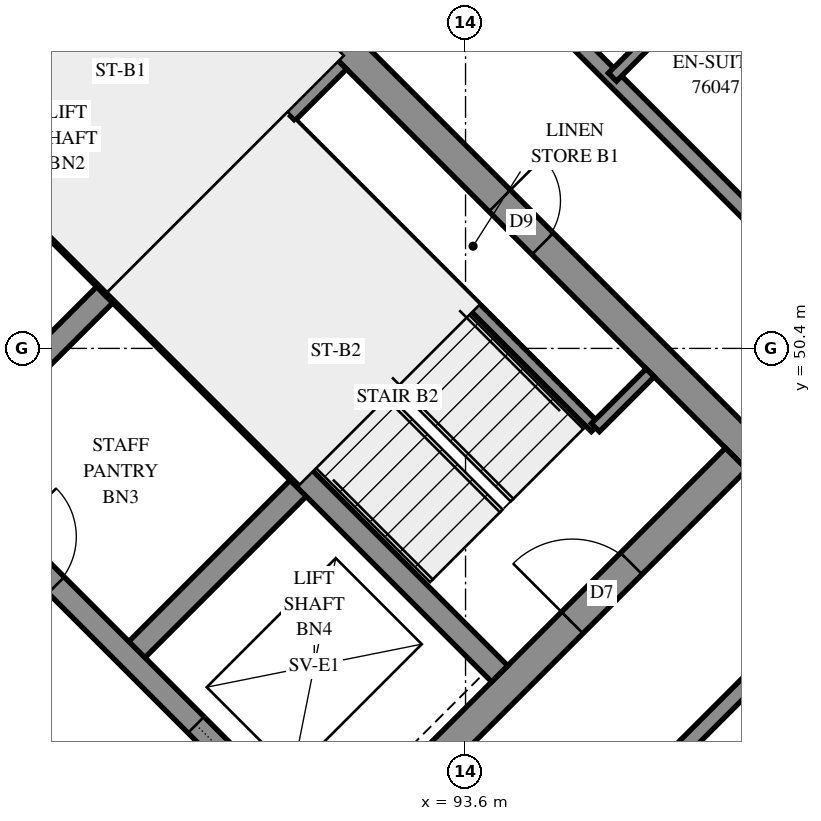
"""IFC4 building model, lengths in metres.
Left out: names, types, materials, properties, quantities, classifications, styles, units other than length and angle.
Written with IfcOpenShell. Run it as: python <this file> out.ifc"""

import sys

from ifc_helpers import new_model, si_unit, direction, frame, frame_2d, origin, place, context, subcontext, project, spatial, polyline, rectangle, outline, extrude, element, fill, save


model = new_model("IFC4")
c1 = context("Model", 3, precision=1e-05, world=origin(), true_north=direction((0.0, 1.0)))
c2 = subcontext(c1, "Body", "Model", "MODEL_VIEW")
j1 = project(units=[si_unit("LENGTHUNIT", "METRE"), si_unit("PLANEANGLEUNIT", "RADIAN")], contexts=[c1])
p1 = place(None, origin())
s1 = spatial("IfcSite", under=j1, at=p1, CompositionType="ELEMENT")
p2 = place(p1, origin())
s2 = spatial("IfcBuilding", under=s1, at=p2, CompositionType="ELEMENT")
p3 = place(p2, frame((0.0, 0.0, 277.8)))
s3 = spatial("IfcBuildingStorey", under=s2, at=p3, CompositionType="ELEMENT", Elevation=277.8)
p4 = place(p3, frame((86.695, 59.696, -0.3), z_axis=(0.0, 0.0, 1.0), x_axis=(0.7071100706, -0.7071034917, 0.0)))
e1 = element("IfcWall", 1, at=p4, inside=s3, PredefinedType="SHEAR", context=c2, shape_type="SweptSolid", body=[
    extrude(rectangle(XDim=15.2, YDim=0.4, at=frame_2d((7.6, 0.0))), origin(), (0.0, 0.0, 1.0), 2.7),
])
p5 = place(p4, frame((10.4, 0.0, 0.3)))
e2 = element("IfcOpeningElement", 2, at=p5, cuts=e1, PredefinedType="OPENING", context=c2, shape_type="SweptSolid", body=[
    extrude(rectangle(XDim=0.8, YDim=2.1, at=frame_2d((0.4, 1.05))), frame((0.0, 0.21, 0.0), z_axis=(0.0, -1.0, 0.0), x_axis=(1.0, 0.0, 0.0)), (0.0, 0.0, 1.0), 0.42),
])
p6 = place(p3, frame((86.978, 38.766, -0.3), z_axis=(0.0, 0.0, 1.0), x_axis=(0.7071067812, 0.7071067812, 0.0)))
e3 = element("IfcWall", 3, at=p6, inside=s3, PredefinedType="SHEAR", context=c2, shape_type="SweptSolid", body=[
    extrude(rectangle(XDim=14.4, YDim=0.4, at=frame_2d((7.2, 0.0))), origin(), (0.0, 0.0, 1.0), 2.7),
])
p7 = place(p6, frame((4.55, 0.0, 0.3)))
e4 = element("IfcOpeningElement", 4, at=p7, cuts=e3, PredefinedType="OPENING", context=c2, shape_type="SweptSolid", body=[
    extrude(rectangle(XDim=1.1, YDim=2.1, at=frame_2d((0.55, 1.05))), frame((0.0, 0.21, 0.0), z_axis=(0.0, -1.0, 0.0), x_axis=(1.0, 0.0, 0.0)), (0.0, 0.0, 1.0), 0.42),
])
p8 = place(p6, frame((11.35, 0.0, 0.3)))
e5 = element("IfcOpeningElement", 5, at=p8, cuts=e3, PredefinedType="OPENING", context=c2, shape_type="SweptSolid", body=[
    extrude(rectangle(XDim=1.1, YDim=2.1, at=frame_2d((0.55, 1.05))), frame((0.0, 0.21, 0.0), z_axis=(0.0, -1.0, 0.0), x_axis=(1.0, 0.0, 0.0)), (0.0, 0.0, 1.0), 0.42),
])
for number, where, z_axis, x_axis in (
    (6, (86.625, 48.878, 0.0), (0.0, 0.0, 1.0), (0.707, 0.707, 0.0)),
    (7, (89.17, 46.332, 0.0), (0.0, 0.0, 1.0), (0.707, 0.707, 0.0)),
):
    element("IfcWall", number, at=place(p3, frame(where, z_axis=z_axis, x_axis=x_axis)), inside=s3, PredefinedType="SOLIDWALL", context=c2, shape_type="SweptSolid", body=[
        extrude(rectangle(XDim=3.3, YDim=0.3, at=frame_2d((1.65, 0.0))), origin(), (0.0, 0.0, 1.0), 3.1),
    ])
p9 = place(p3, frame((78.988, 51.423, 0.0), z_axis=(0.0, 0.0, 1.0), x_axis=(0.7071067812, -0.7071067812, 0.0)))
e8 = element("IfcWall", 8, at=p9, inside=s3, PredefinedType="SOLIDWALL", context=c2, shape_type="SweptSolid", body=[
    extrude(rectangle(XDim=14.4, YDim=0.3, at=frame_2d((7.2, 0.0))), origin(), (0.0, 0.0, 1.0), 3.1),
])
p10 = place(p9, frame((1.35, 0.0, 0.0)))
e9 = element("IfcOpeningElement", 9, at=p10, cuts=e8, PredefinedType="OPENING", context=c2, shape_type="SweptSolid", body=[
    extrude(rectangle(XDim=0.9, YDim=2.1, at=frame_2d((0.45, 1.05))), frame((0.0, 0.16, 0.0), z_axis=(0.0, -1.0, 0.0), x_axis=(1.0, 0.0, 0.0)), (0.0, 0.0, 1.0), 0.32),
])
p11 = place(p9, frame((4.95, 0.0, 0.0)))
e10 = element("IfcOpeningElement", 10, at=p11, cuts=e8, PredefinedType="OPENING", context=c2, shape_type="SweptSolid", body=[
    extrude(rectangle(XDim=0.9, YDim=2.1, at=frame_2d((0.45, 1.05))), frame((0.0, 0.16, 0.0), z_axis=(0.0, -1.0, 0.0), x_axis=(1.0, 0.0, 0.0)), (0.0, 0.0, 1.0), 0.32),
])
p12 = place(p9, frame((8.55, 0.0, 0.0)))
e11 = element("IfcOpeningElement", 11, at=p12, cuts=e8, PredefinedType="OPENING", context=c2, shape_type="SweptSolid", body=[
    extrude(rectangle(XDim=0.9, YDim=2.1, at=frame_2d((0.45, 1.05))), frame((0.0, 0.16, 0.0), z_axis=(0.0, -1.0, 0.0), x_axis=(1.0, 0.0, 0.0)), (0.0, 0.0, 1.0), 0.32),
])
p13 = place(p9, frame((12.05, 0.0, 0.0)))
e12 = element("IfcOpeningElement", 12, at=p13, cuts=e8, PredefinedType="OPENING", context=c2, shape_type="SweptSolid", body=[
    extrude(rectangle(XDim=1.1, YDim=2.1, at=frame_2d((0.55, 1.05))), frame((0.0, 0.16, 0.0), z_axis=(0.0, -1.0, 0.0), x_axis=(1.0, 0.0, 0.0)), (0.0, 0.0, 1.0), 0.32),
])
p14 = place(p3, frame((81.534, 53.969, 0.0), z_axis=(0.0, 0.0, 1.0), x_axis=(0.707103309, -0.7071102534, 0.0)))
e13 = element("IfcWall", 13, at=p14, inside=s3, PredefinedType="SOLIDWALL", context=c2, shape_type="SweptSolid", body=[
    extrude(rectangle(XDim=14.4, YDim=0.3, at=frame_2d((7.2, 0.0))), origin(), (0.0, 0.0, 1.0), 3.1),
])
p15 = place(p14, frame((8.55, 0.0, 0.0)))
e14 = element("IfcOpeningElement", 14, at=p15, cuts=e13, PredefinedType="OPENING", context=c2, shape_type="SweptSolid", body=[
    extrude(rectangle(XDim=0.9, YDim=2.1, at=frame_2d((0.45, 1.05))), frame((0.0, 0.16, 0.0), z_axis=(0.0, -1.0, 0.0), x_axis=(1.0, 0.0, 0.0)), (0.0, 0.0, 1.0), 0.32),
])
p16 = place(p14, frame((1.25, 0.0, 0.0)))
e15 = element("IfcOpeningElement", 15, at=p16, cuts=e13, PredefinedType="OPENING", context=c2, shape_type="SweptSolid", body=[
    extrude(rectangle(XDim=1.1, YDim=2.1, at=frame_2d((0.55, 1.05))), frame((0.0, 0.16, 0.0), z_axis=(0.0, -1.0, 0.0), x_axis=(1.0, 0.0, 0.0)), (0.0, 0.0, 1.0), 0.32),
])
p17 = place(p14, frame((4.85, 0.0, 0.0)))
e16 = element("IfcOpeningElement", 16, at=p17, cuts=e13, PredefinedType="OPENING", context=c2, shape_type="SweptSolid", body=[
    extrude(rectangle(XDim=1.1, YDim=2.1, at=frame_2d((0.55, 1.05))), frame((0.0, 0.16, 0.0), z_axis=(0.0, -1.0, 0.0), x_axis=(1.0, 0.0, 0.0)), (0.0, 0.0, 1.0), 0.32),
])
p18 = place(p14, frame((12.05, 0.0, 0.0)))
e17 = element("IfcOpeningElement", 17, at=p18, cuts=e13, PredefinedType="OPENING", context=c2, shape_type="SweptSolid", body=[
    extrude(rectangle(XDim=1.1, YDim=2.1, at=frame_2d((0.55, 1.05))), frame((0.0, 0.16, 0.0), z_axis=(0.0, -1.0, 0.0), x_axis=(1.0, 0.0, 0.0)), (0.0, 0.0, 1.0), 0.32),
])
for number, where, z_axis, x_axis in (
    (18, (83.867, 56.302, 0.0), (0.0, 0.0, 1.0), (0.707, -0.707, 0.0)),
    (19, (88.958, 51.211, 0.0), (0.0, 0.0, 1.0), (0.707, -0.707, 0.0)),
):
    element("IfcWall", number, at=place(p3, frame(where, z_axis=z_axis, x_axis=x_axis)), inside=s3, PredefinedType="SOLIDWALL", context=c2, shape_type="SweptSolid", body=[
        extrude(rectangle(XDim=7.2, YDim=0.3, at=frame_2d((3.6, 0.0))), origin(), (0.0, 0.0, 1.0), 3.1),
    ])
p19 = place(p3, frame((88.958, 51.211, 0.0), z_axis=(0.0, 0.0, 1.0), x_axis=(0.7071067812, 0.7071067812, 0.0)))
e20 = element("IfcWall", 20, at=p19, inside=s3, PredefinedType="SOLIDWALL", context=c2, shape_type="SweptSolid", body=[
    extrude(rectangle(XDim=4.2, YDim=0.3, at=frame_2d((2.1, 0.0))), origin(), (0.0, 0.0, 1.0), 3.1),
])
p20 = place(p3, frame((100.466, 52.113, 0.0), z_axis=(0.0, 0.0, 1.0), x_axis=(-0.7071067812, 0.7071067812, 0.0)))
e21 = element("IfcWall", 21, at=p20, inside=s3, PredefinedType="SOLIDWALL", context=c2, shape_type="SweptSolid", body=[
    extrude(outline(polyline([(0.039, -0.225), (6.718, -0.225), (6.718, 0.225), (-0.039, 0.225), (0.039, -0.225)])), origin(), (0.0, 0.0, 1.0), 3.1),
])
p21 = place(p20, frame((0.65, 0.0, 0.45)))
e22 = element("IfcOpeningElement", 22, at=p21, cuts=e21, PredefinedType="OPENING", context=c2, shape_type="SweptSolid", body=[
    extrude(rectangle(XDim=2.8, YDim=2.55, at=frame_2d((1.4, 1.275))), frame((0.0, 0.235, 0.0), z_axis=(0.0, -1.0, 0.0), x_axis=(1.0, 0.0, 0.0)), (0.0, 0.0, 1.0), 0.47),
])
p22 = place(p20, frame((4.909, 0.0, 0.45)))
e23 = element("IfcOpeningElement", 23, at=p22, cuts=e21, PredefinedType="OPENING", context=c2, shape_type="SweptSolid", body=[
    extrude(rectangle(XDim=1.2, YDim=2.55, at=frame_2d((0.6, 1.275))), frame((0.0, 0.235, 0.0), z_axis=(0.0, -1.0, 0.0), x_axis=(1.0, 0.0, 0.0)), (0.0, 0.0, 1.0), 0.47),
])
p23 = place(p3, frame((91.313, 53.354, 0.0), z_axis=(0.0, 0.0, 1.0), x_axis=(0.7071067812, -0.7071067812, 0.0)))
e24 = element("IfcWall", 24, at=p23, inside=s3, PredefinedType="PARTITIONING", context=c2, shape_type="SweptSolid", body=[
    extrude(rectangle(XDim=5.65, YDim=0.15, at=frame_2d((2.825, 0.0))), origin(), (0.0, 0.0, 1.0), 3.1),
])
p24 = place(p3, frame((95.308, 49.358, 0.0), z_axis=(0.0, 0.0, 1.0), x_axis=(0.70705776, 0.707155799, 0.0)))
e25 = element("IfcWall", 25, at=p24, inside=s3, PredefinedType="PARTITIONING", context=c2, shape_type="SweptSolid", body=[
    extrude(rectangle(XDim=1.02, YDim=0.15, at=frame_2d((0.51, 0.0))), origin(), (0.0, 0.0, 1.0), 3.1),
])
p25 = place(p3, frame((94.331, 43.009, 0.0), z_axis=(0.0, 0.0, 1.0), x_axis=(0.7071067812, 0.7071067812, 0.0)))
e26 = element("IfcWall", 26, at=p25, inside=s3, PredefinedType="PARTITIONING", context=c2, shape_type="SweptSolid", body=[
    extrude(rectangle(XDim=8.601, YDim=0.2, at=frame_2d((4.301, 0.0))), origin(), (0.0, 0.0, 1.0), 3.1),
])
p26 = place(p25, frame((0.194, 0.0, 0.0)))
e27 = element("IfcOpeningElement", 27, at=p26, cuts=e26, PredefinedType="OPENING", context=c2, shape_type="SweptSolid", body=[
    extrude(rectangle(XDim=1.0, YDim=2.1, at=frame_2d((0.5, 1.05))), frame((0.0, 0.11, 0.0), z_axis=(0.0, -1.0, 0.0), x_axis=(1.0, 0.0, 0.0)), (0.0, 0.0, 1.0), 0.22),
])
p27 = place(p3, frame((94.617, 54.879, 0.0), z_axis=(0.0, 0.0, 1.0), x_axis=(0.7071067812, -0.7071067812, 0.0)))
e28 = element("IfcWall", 28, at=p27, inside=s3, PredefinedType="PARTITIONING", context=c2, shape_type="SweptSolid", body=[
    extrude(rectangle(XDim=6.191, YDim=0.2, at=frame_2d((3.096, 0.0))), origin(), (0.0, 0.0, 1.0), 3.1),
])
p28 = place(p27, frame((4.346, 0.0, 0.0)))
e29 = element("IfcOpeningElement", 29, at=p28, cuts=e28, PredefinedType="OPENING", context=c2, shape_type="SweptSolid", body=[
    extrude(rectangle(XDim=0.9, YDim=2.1, at=frame_2d((0.45, 1.05))), frame((0.0, 0.11, 0.0), z_axis=(0.0, -1.0, 0.0), x_axis=(1.0, 0.0, 0.0)), (0.0, 0.0, 1.0), 0.22),
])
p29 = place(p3, frame((95.179, 42.161, 0.0), z_axis=(0.0, 0.0, 1.0), x_axis=(0.707115476, 0.7070980863, 0.0)))
e30 = element("IfcWall", 30, at=p29, inside=s3, PredefinedType="PARTITIONING", context=c2, shape_type="SweptSolid", body=[
    extrude(rectangle(XDim=5.75, YDim=0.2, at=frame_2d((2.875, 0.0))), origin(), (0.0, 0.0, 1.0), 3.1),
])
p30 = place(p3, frame((95.533, 53.969, 0.0), z_axis=(0.0, 0.0, 1.0), x_axis=(0.7070811488, 0.7071324126, 0.0)))
e31 = element("IfcWall", 31, at=p30, inside=s3, PredefinedType="PARTITIONING", context=c2, shape_type="SweptSolid", body=[
    extrude(rectangle(XDim=1.951, YDim=0.15, at=frame_2d((0.975, 0.0))), origin(), (0.0, 0.0, 1.0), 3.1),
])
p31 = place(p30, frame((0.98, 0.0, 0.0)))
e32 = element("IfcOpeningElement", 32, at=p31, cuts=e31, PredefinedType="OPENING", context=c2, shape_type="SweptSolid", body=[
    extrude(rectangle(XDim=0.8, YDim=2.1, at=frame_2d((0.4, 1.05))), frame((0.0, 0.085, 0.0), z_axis=(0.0, -1.0, 0.0), x_axis=(1.0, 0.0, 0.0)), (0.0, 0.0, 1.0), 0.17),
])
p32 = place(p5, origin())
e33 = element("IfcDoor", 33, at=p32, inside=s3, OperationType="SINGLE_SWING_RIGHT", PredefinedType="DOOR", context=c2, shape_type="SweptSolid", body=[
    extrude(rectangle(XDim=0.8, YDim=2.1, at=frame_2d((0.4, 1.05))), frame((0.0, 0.025, 0.0), z_axis=(0.0, -1.0, 0.0), x_axis=(1.0, 0.0, 0.0)), (0.0, 0.0, 1.0), 0.05),
])
fill(e2, e33)
p33 = place(p8, origin())
e34 = element("IfcDoor", 34, at=p33, inside=s3, OperationType="SINGLE_SWING_RIGHT", PredefinedType="DOOR", context=c2, shape_type="SweptSolid", body=[
    extrude(rectangle(XDim=1.1, YDim=2.1, at=frame_2d((0.55, 1.05))), frame((0.0, 0.025, 0.0), z_axis=(0.0, -1.0, 0.0), x_axis=(1.0, 0.0, 0.0)), (0.0, 0.0, 1.0), 0.05),
])
fill(e5, e34)
p34 = place(p15, origin())
e35 = element("IfcDoor", 35, at=p34, inside=s3, OperationType="SINGLE_SWING_LEFT", PredefinedType="DOOR", context=c2, shape_type="SweptSolid", body=[
    extrude(rectangle(XDim=0.9, YDim=2.1, at=frame_2d((0.45, 1.05))), frame((0.0, 0.025, 0.0), z_axis=(0.0, -1.0, 0.0), x_axis=(1.0, 0.0, 0.0)), (0.0, 0.0, 1.0), 0.05),
])
fill(e14, e35)
p35 = place(p18, origin())
e36 = element("IfcDoor", 36, at=p35, inside=s3, OperationType="SLIDING_TO_RIGHT", PredefinedType="DOOR", context=c2, shape_type="SweptSolid", body=[
    extrude(rectangle(XDim=1.1, YDim=2.1, at=frame_2d((0.55, 1.05))), frame((0.0, 0.025, 0.0), z_axis=(0.0, -1.0, 0.0), x_axis=(1.0, 0.0, 0.0)), (0.0, 0.0, 1.0), 0.05),
])
fill(e17, e36)
save(model, sys.argv[1])
